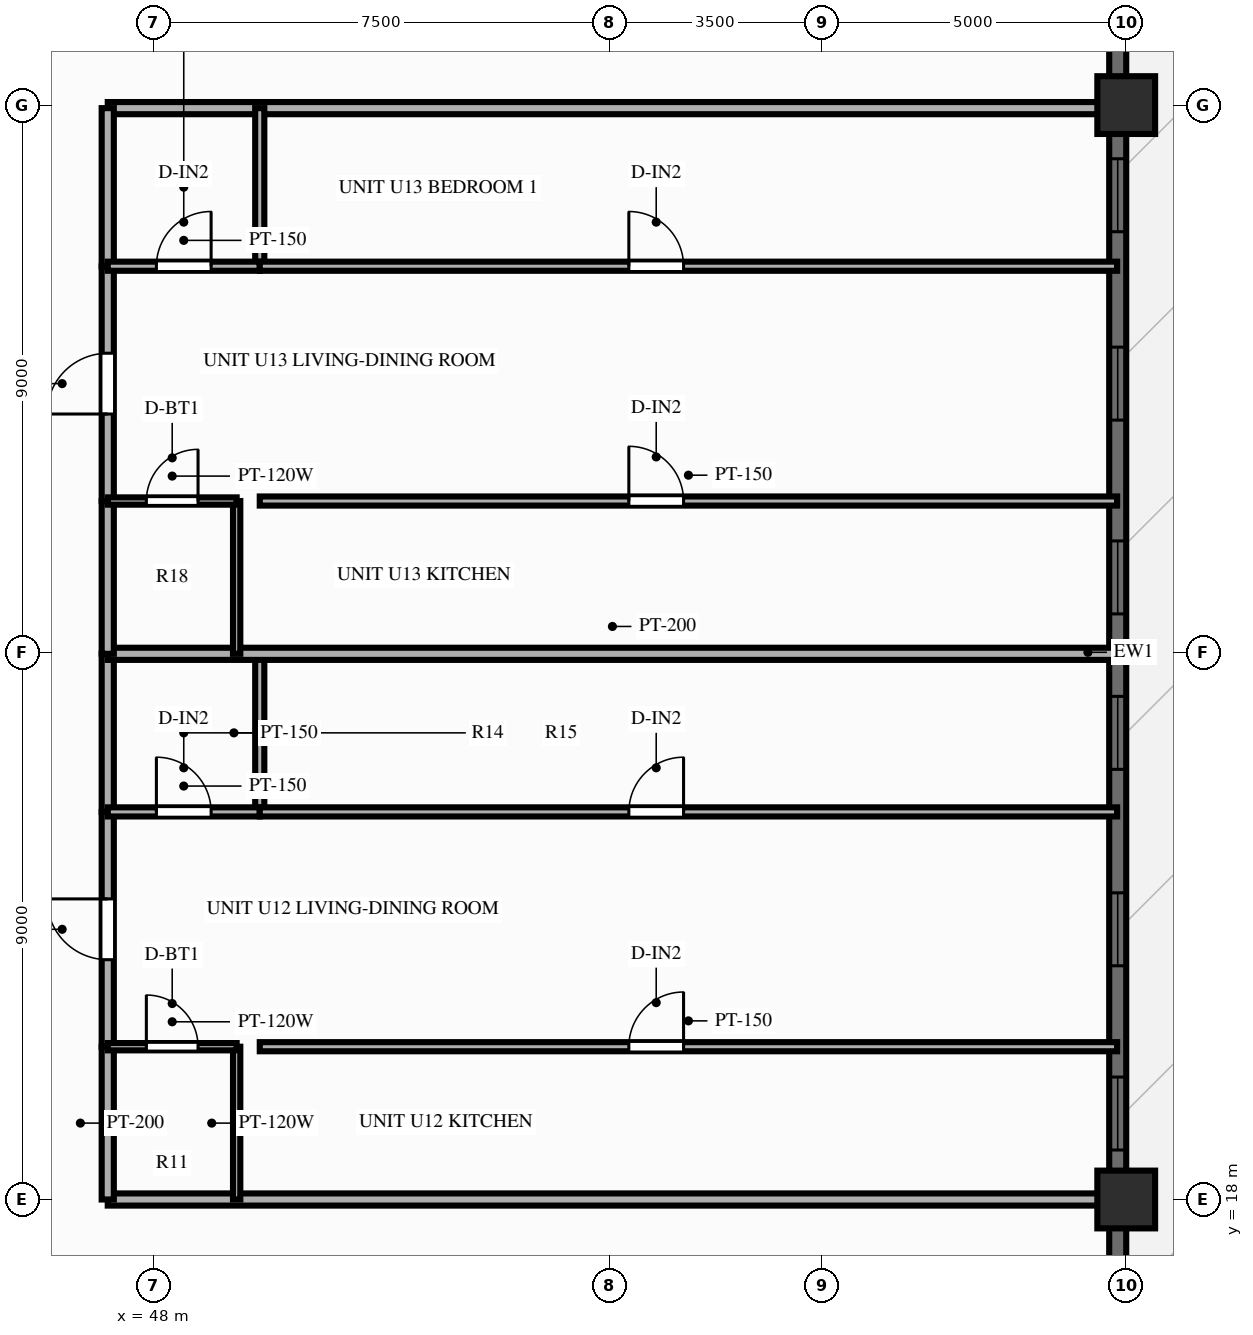
"""IFC4 building model, lengths in metres.
Left out: names, types, materials, properties, quantities, classifications, styles, units other than length and angle.
Written with IfcOpenShell. Run it as: python <this file> out.ifc"""

import sys

from ifc_helpers import new_model, si_unit, direction, frame, frame_2d, origin, origin_2d, place, context, subcontext, project, spatial, rectangle, extrude, source, transform, mapped, element, fill, save


model = new_model("IFC4")
c1 = context("Model", 3, precision=1e-05, world=origin(), true_north=direction((0.0, 1.0)))
c2 = subcontext(c1, "Body", "Model", "MODEL_VIEW")
j1 = project(units=[si_unit("LENGTHUNIT", "METRE"), si_unit("PLANEANGLEUNIT", "RADIAN")], contexts=[c1])
p1 = place(None, origin())
s1 = spatial("IfcSite", under=j1, at=p1, CompositionType="ELEMENT")
p2 = place(p1, origin())
s2 = spatial("IfcBuilding", under=s1, at=p2, CompositionType="ELEMENT")
p3 = place(p2, frame((0.0, 0.0, 89.85)))
s3 = spatial("IfcBuildingStorey", under=s2, at=p3, CompositionType="ELEMENT", Elevation=89.85)
m1 = source(origin(), c2, "Body", "SweptSolid", [
    extrude(rectangle(XDim=0.95, YDim=0.95, at=origin_2d()), origin(), (0.0, 0.0, 1.0), 3.0),
])
for number, where, z_axis, x_axis in (
    (1, (64.0, 18.0, 0.0), (0.0, 0.0, 1.0), (1.0, 0.0, 0.0)),
    (2, (64.0, 36.0, 0.0), (0.0, 0.0, 1.0), (1.0, 0.0, 0.0)),
):
    element("IfcColumn", number, at=place(p3, frame(where, z_axis=z_axis, x_axis=x_axis)), inside=s3, PredefinedType="COLUMN", context=c2, shape_type="MappedRepresentation", body=[
        mapped(m1, transform((0.0, 0.0, 0.0), scale=1.0)),
    ])
p4 = place(p3, frame((63.86, 7.2, 0.0), z_axis=(0.0, 0.0, 1.0), x_axis=(0.0, 1.0, 0.0)))
e3 = element("IfcWall", 3, at=p4, inside=s3, PredefinedType="SOLIDWALL", context=c2, shape_type="SweptSolid", body=[
    extrude(rectangle(XDim=39.6, YDim=0.28, at=frame_2d((19.8, 0.0))), origin(), (0.0, 0.0, 1.0), 2.28),
])
p5 = place(p4, frame((6.2, 0.0, 0.0), z_axis=(0.0, 0.0, 1.0), x_axis=(-1.0, 0.0, 0.0)))
e4 = element("IfcOpeningElement", 4, at=p5, cuts=e3, PredefinedType="OPENING", context=c2, shape_type="SweptSolid", body=[
    extrude(rectangle(XDim=1.6, YDim=2.15, at=frame_2d((0.8, 1.075))), frame((0.0, 0.152, 0.0), z_axis=(0.0, -1.0, 0.0), x_axis=(1.0, 0.0, 0.0)), (0.0, 0.0, 1.0), 0.304),
])
p6 = place(p4, frame((11.614, 0.0, 0.25)))
e5 = element("IfcOpeningElement", 5, at=p6, cuts=e3, PredefinedType="OPENING", context=c2, shape_type="SweptSolid", body=[
    extrude(rectangle(XDim=1.2, YDim=1.5, at=frame_2d((0.6, 0.75))), frame((0.0, 0.152, 0.0), z_axis=(0.0, -1.0, 0.0), x_axis=(1.0, 0.0, 0.0)), (0.0, 0.0, 1.0), 0.304),
])
p7 = place(p4, frame((14.644, 0.0, 0.25)))
e6 = element("IfcOpeningElement", 6, at=p7, cuts=e3, PredefinedType="OPENING", context=c2, shape_type="SweptSolid", body=[
    extrude(rectangle(XDim=1.2, YDim=1.5, at=frame_2d((0.6, 0.75))), frame((0.0, 0.152, 0.0), z_axis=(0.0, -1.0, 0.0), x_axis=(1.0, 0.0, 0.0)), (0.0, 0.0, 1.0), 0.304),
])
p8 = place(p4, frame((17.875, 0.0, 0.25)))
e7 = element("IfcOpeningElement", 7, at=p8, cuts=e3, PredefinedType="OPENING", context=c2, shape_type="SweptSolid", body=[
    extrude(rectangle(XDim=1.2, YDim=1.5, at=frame_2d((0.6, 0.75))), frame((0.0, 0.152, 0.0), z_axis=(0.0, -1.0, 0.0), x_axis=(1.0, 0.0, 0.0)), (0.0, 0.0, 1.0), 0.304),
])
p9 = place(p4, frame((20.431, 0.0, 0.25)))
e8 = element("IfcOpeningElement", 8, at=p9, cuts=e3, PredefinedType="OPENING", context=c2, shape_type="SweptSolid", body=[
    extrude(rectangle(XDim=1.2, YDim=1.5, at=frame_2d((0.6, 0.75))), frame((0.0, 0.152, 0.0), z_axis=(0.0, -1.0, 0.0), x_axis=(1.0, 0.0, 0.0)), (0.0, 0.0, 1.0), 0.304),
])
p10 = place(p4, frame((23.619, 0.0, 0.25)))
e9 = element("IfcOpeningElement", 9, at=p10, cuts=e3, PredefinedType="OPENING", context=c2, shape_type="SweptSolid", body=[
    extrude(rectangle(XDim=1.2, YDim=1.5, at=frame_2d((0.6, 0.75))), frame((0.0, 0.152, 0.0), z_axis=(0.0, -1.0, 0.0), x_axis=(1.0, 0.0, 0.0)), (0.0, 0.0, 1.0), 0.304),
])
p11 = place(p4, frame((26.718, 0.0, 0.25)))
e10 = element("IfcOpeningElement", 10, at=p11, cuts=e3, PredefinedType="OPENING", context=c2, shape_type="SweptSolid", body=[
    extrude(rectangle(XDim=1.2, YDim=1.5, at=frame_2d((0.6, 0.75))), frame((0.0, 0.152, 0.0), z_axis=(0.0, -1.0, 0.0), x_axis=(1.0, 0.0, 0.0)), (0.0, 0.0, 1.0), 0.304),
])
p12 = place(p4, frame((33.6, 0.0, 0.25)))
e11 = element("IfcOpeningElement", 11, at=p12, cuts=e3, PredefinedType="OPENING", context=c2, shape_type="SweptSolid", body=[
    extrude(rectangle(XDim=1.2, YDim=1.5, at=frame_2d((0.6, 0.75))), frame((0.0, 0.152, 0.0), z_axis=(0.0, -1.0, 0.0), x_axis=(1.0, 0.0, 0.0)), (0.0, 0.0, 1.0), 0.304),
])
for number, where, z_axis, x_axis in (
    (12, (47.25, 18.0, 0.0), (0.0, 0.0, 1.0), (1.0, 0.0, 0.0)),
    (13, (47.25, 35.95, 0.0), (0.0, 0.0, 1.0), (1.0, 0.0, 0.0)),
):
    element("IfcWall", number, at=place(p3, frame(where, z_axis=z_axis, x_axis=x_axis)), inside=s3, PredefinedType="PARTITIONING", context=c2, shape_type="SweptSolid", body=[
        extrude(rectangle(XDim=16.6, YDim=0.2, at=frame_2d((8.3, 0.0))), origin(), (0.0, 0.0, 1.0), 2.34),
    ])
p13 = place(p3, frame((47.25, 18.0, 0.0), z_axis=(0.0, 0.0, 1.0), x_axis=(0.0, 1.0, 0.0)))
e14 = element("IfcWall", 14, at=p13, inside=s3, PredefinedType="PARTITIONING", context=c2, shape_type="SweptSolid", body=[
    extrude(rectangle(XDim=2.513, YDim=0.2, at=frame_2d((1.256, 0.0))), origin(), (0.0, 0.0, 1.0), 2.79),
])
p14 = place(p3, frame((47.25, 20.513, 0.0), z_axis=(0.0, 0.0, 1.0), x_axis=(0.0, 1.0, 0.0)))
e15 = element("IfcWall", 15, at=p14, inside=s3, PredefinedType="PARTITIONING", context=c2, shape_type="SweptSolid", body=[
    extrude(rectangle(XDim=3.862, YDim=0.2, at=frame_2d((1.931, 0.0))), origin(), (0.0, 0.0, 1.0), 2.79),
])
p15 = place(p14, frame((1.431, 0.0, 0.0)))
e16 = element("IfcOpeningElement", 16, at=p15, cuts=e15, PredefinedType="OPENING", context=c2, shape_type="SweptSolid", body=[
    extrude(rectangle(XDim=1.0, YDim=2.15, at=frame_2d((0.5, 1.075))), frame((0.0, 0.112, 0.0), z_axis=(0.0, -1.0, 0.0), x_axis=(1.0, 0.0, 0.0)), (0.0, 0.0, 1.0), 0.224),
])
p16 = place(p3, frame((47.25, 24.375, 0.0), z_axis=(0.0, 0.0, 1.0), x_axis=(0.0, 1.0, 0.0)))
e17 = element("IfcWall", 17, at=p16, inside=s3, PredefinedType="PARTITIONING", context=c2, shape_type="SweptSolid", body=[
    extrude(rectangle(XDim=2.6, YDim=0.2, at=frame_2d((1.3, 0.0))), origin(), (0.0, 0.0, 1.0), 2.79),
])
p17 = place(p3, frame((49.37, 18.0, 0.0), z_axis=(0.0, 0.0, 1.0), x_axis=(0.0, 1.0, 0.0)))
e18 = element("IfcWall", 18, at=p17, inside=s3, PredefinedType="PARTITIONING", context=c2, shape_type="SweptSolid", body=[
    extrude(rectangle(XDim=2.513, YDim=0.12, at=frame_2d((1.256, 0.0))), origin(), (0.0, 0.0, 1.0), 2.79),
])
p18 = place(p3, frame((49.75, 24.375, 0.0), z_axis=(0.0, 0.0, 1.0), x_axis=(0.0, 1.0, 0.0)))
e19 = element("IfcWall", 19, at=p18, inside=s3, PredefinedType="PARTITIONING", context=c2, shape_type="SweptSolid", body=[
    extrude(rectangle(XDim=2.6, YDim=0.15, at=frame_2d((1.3, 0.0))), origin(), (0.0, 0.0, 1.0), 2.79),
])
p19 = place(p3, frame((47.25, 20.513, 0.0), z_axis=(0.0, 0.0, 1.0), x_axis=(1.0, 0.0, 0.0)))
e20 = element("IfcWall", 20, at=p19, inside=s3, PredefinedType="PARTITIONING", context=c2, shape_type="SweptSolid", body=[
    extrude(rectangle(XDim=2.12, YDim=0.12, at=frame_2d((1.06, 0.0))), origin(), (0.0, 0.0, 1.0), 2.79),
])
p20 = place(p19, frame((0.635, 0.0, 0.0)))
e21 = element("IfcOpeningElement", 21, at=p20, cuts=e20, PredefinedType="OPENING", context=c2, shape_type="SweptSolid", body=[
    extrude(rectangle(XDim=0.85, YDim=2.05, at=frame_2d((0.425, 1.025))), frame((0.0, 0.072, 0.0), z_axis=(0.0, -1.0, 0.0), x_axis=(1.0, 0.0, 0.0)), (0.0, 0.0, 1.0), 0.144),
])
p21 = place(p3, frame((49.75, 20.513, 0.0), z_axis=(0.0, 0.0, 1.0), x_axis=(1.0, 0.0, 0.0)))
e22 = element("IfcWall", 22, at=p21, inside=s3, PredefinedType="PARTITIONING", context=c2, shape_type="SweptSolid", body=[
    extrude(rectangle(XDim=14.1, YDim=0.15, at=frame_2d((7.05, 0.0))), origin(), (0.0, 0.0, 1.0), 2.79),
])
p22 = place(p21, frame((6.07, 0.0, 0.0)))
e23 = element("IfcOpeningElement", 23, at=p22, cuts=e22, PredefinedType="OPENING", context=c2, shape_type="SweptSolid", body=[
    extrude(rectangle(XDim=0.9, YDim=2.1, at=frame_2d((0.45, 1.05))), frame((0.0, 0.087, 0.0), z_axis=(0.0, -1.0, 0.0), x_axis=(1.0, 0.0, 0.0)), (0.0, 0.0, 1.0), 0.174),
])
p23 = place(p3, frame((47.25, 24.375, 0.0), z_axis=(0.0, 0.0, 1.0), x_axis=(1.0, 0.0, 0.0)))
e24 = element("IfcWall", 24, at=p23, inside=s3, PredefinedType="PARTITIONING", context=c2, shape_type="SweptSolid", body=[
    extrude(rectangle(XDim=2.5, YDim=0.15, at=frame_2d((1.25, 0.0))), origin(), (0.0, 0.0, 1.0), 2.79),
])
p24 = place(p23, frame((0.8, 0.0, 0.0)))
e25 = element("IfcOpeningElement", 25, at=p24, cuts=e24, PredefinedType="OPENING", context=c2, shape_type="SweptSolid", body=[
    extrude(rectangle(XDim=0.9, YDim=2.1, at=frame_2d((0.45, 1.05))), frame((0.0, 0.087, 0.0), z_axis=(0.0, -1.0, 0.0), x_axis=(1.0, 0.0, 0.0)), (0.0, 0.0, 1.0), 0.174),
])
p25 = place(p3, frame((49.75, 24.375, 0.0), z_axis=(0.0, 0.0, 1.0), x_axis=(1.0, 0.0, 0.0)))
e26 = element("IfcWall", 26, at=p25, inside=s3, PredefinedType="PARTITIONING", context=c2, shape_type="SweptSolid", body=[
    extrude(rectangle(XDim=14.1, YDim=0.15, at=frame_2d((7.05, 0.0))), origin(), (0.0, 0.0, 1.0), 2.79),
])
p26 = place(p25, frame((6.07, 0.0, 0.0)))
e27 = element("IfcOpeningElement", 27, at=p26, cuts=e26, PredefinedType="OPENING", context=c2, shape_type="SweptSolid", body=[
    extrude(rectangle(XDim=0.9, YDim=2.1, at=frame_2d((0.45, 1.05))), frame((0.0, 0.087, 0.0), z_axis=(0.0, -1.0, 0.0), x_axis=(1.0, 0.0, 0.0)), (0.0, 0.0, 1.0), 0.174),
])
p27 = place(p3, frame((47.25, 26.975, 0.0), z_axis=(0.0, 0.0, 1.0), x_axis=(1.0, 0.0, 0.0)))
e28 = element("IfcWall", 28, at=p27, inside=s3, PredefinedType="PARTITIONING", context=c2, shape_type="SweptSolid", body=[
    extrude(rectangle(XDim=16.6, YDim=0.2, at=frame_2d((8.3, 0.0))), origin(), (0.0, 0.0, 1.0), 2.79),
])
p28 = place(p3, frame((47.25, 26.975, 0.0), z_axis=(0.0, 0.0, 1.0), x_axis=(0.0, 1.0, 0.0)))
e29 = element("IfcWall", 29, at=p28, inside=s3, PredefinedType="PARTITIONING", context=c2, shape_type="SweptSolid", body=[
    extrude(rectangle(XDim=2.513, YDim=0.2, at=frame_2d((1.256, 0.0))), origin(), (0.0, 0.0, 1.0), 2.79),
])
p29 = place(p3, frame((47.25, 29.488, 0.0), z_axis=(0.0, 0.0, 1.0), x_axis=(0.0, 1.0, 0.0)))
e30 = element("IfcWall", 30, at=p29, inside=s3, PredefinedType="PARTITIONING", context=c2, shape_type="SweptSolid", body=[
    extrude(rectangle(XDim=3.862, YDim=0.2, at=frame_2d((1.931, 0.0))), origin(), (0.0, 0.0, 1.0), 2.79),
])
p30 = place(p29, frame((1.431, 0.0, 0.0)))
e31 = element("IfcOpeningElement", 31, at=p30, cuts=e30, PredefinedType="OPENING", context=c2, shape_type="SweptSolid", body=[
    extrude(rectangle(XDim=1.0, YDim=2.15, at=frame_2d((0.5, 1.075))), frame((0.0, 0.112, 0.0), z_axis=(0.0, -1.0, 0.0), x_axis=(1.0, 0.0, 0.0)), (0.0, 0.0, 1.0), 0.224),
])
p31 = place(p3, frame((47.25, 33.35, 0.0), z_axis=(0.0, 0.0, 1.0), x_axis=(0.0, 1.0, 0.0)))
e32 = element("IfcWall", 32, at=p31, inside=s3, PredefinedType="PARTITIONING", context=c2, shape_type="SweptSolid", body=[
    extrude(rectangle(XDim=2.6, YDim=0.2, at=frame_2d((1.3, 0.0))), origin(), (0.0, 0.0, 1.0), 2.79),
])
p32 = place(p3, frame((49.37, 26.975, 0.0), z_axis=(0.0, 0.0, 1.0), x_axis=(0.0, 1.0, 0.0)))
e33 = element("IfcWall", 33, at=p32, inside=s3, PredefinedType="PARTITIONING", context=c2, shape_type="SweptSolid", body=[
    extrude(rectangle(XDim=2.513, YDim=0.12, at=frame_2d((1.256, 0.0))), origin(), (0.0, 0.0, 1.0), 2.79),
])
p33 = place(p3, frame((49.75, 33.35, 0.0), z_axis=(0.0, 0.0, 1.0), x_axis=(0.0, 1.0, 0.0)))
e34 = element("IfcWall", 34, at=p33, inside=s3, PredefinedType="PARTITIONING", context=c2, shape_type="SweptSolid", body=[
    extrude(rectangle(XDim=2.6, YDim=0.15, at=frame_2d((1.3, 0.0))), origin(), (0.0, 0.0, 1.0), 2.79),
])
p34 = place(p3, frame((47.25, 29.488, 0.0), z_axis=(0.0, 0.0, 1.0), x_axis=(1.0, 0.0, 0.0)))
e35 = element("IfcWall", 35, at=p34, inside=s3, PredefinedType="PARTITIONING", context=c2, shape_type="SweptSolid", body=[
    extrude(rectangle(XDim=2.12, YDim=0.12, at=frame_2d((1.06, 0.0))), origin(), (0.0, 0.0, 1.0), 2.79),
])
p35 = place(p34, frame((0.635, 0.0, 0.0)))
e36 = element("IfcOpeningElement", 36, at=p35, cuts=e35, PredefinedType="OPENING", context=c2, shape_type="SweptSolid", body=[
    extrude(rectangle(XDim=0.85, YDim=2.05, at=frame_2d((0.425, 1.025))), frame((0.0, 0.072, 0.0), z_axis=(0.0, -1.0, 0.0), x_axis=(1.0, 0.0, 0.0)), (0.0, 0.0, 1.0), 0.144),
])
p36 = place(p3, frame((49.75, 29.488, 0.0), z_axis=(0.0, 0.0, 1.0), x_axis=(1.0, 0.0, 0.0)))
e37 = element("IfcWall", 37, at=p36, inside=s3, PredefinedType="PARTITIONING", context=c2, shape_type="SweptSolid", body=[
    extrude(rectangle(XDim=14.1, YDim=0.15, at=frame_2d((7.05, 0.0))), origin(), (0.0, 0.0, 1.0), 2.79),
])
p37 = place(p36, frame((6.07, 0.0, 0.0)))
e38 = element("IfcOpeningElement", 38, at=p37, cuts=e37, PredefinedType="OPENING", context=c2, shape_type="SweptSolid", body=[
    extrude(rectangle(XDim=0.9, YDim=2.1, at=frame_2d((0.45, 1.05))), frame((0.0, 0.087, 0.0), z_axis=(0.0, -1.0, 0.0), x_axis=(1.0, 0.0, 0.0)), (0.0, 0.0, 1.0), 0.174),
])
p38 = place(p3, frame((47.25, 33.35, 0.0), z_axis=(0.0, 0.0, 1.0), x_axis=(1.0, 0.0, 0.0)))
e39 = element("IfcWall", 39, at=p38, inside=s3, PredefinedType="PARTITIONING", context=c2, shape_type="SweptSolid", body=[
    extrude(rectangle(XDim=2.5, YDim=0.15, at=frame_2d((1.25, 0.0))), origin(), (0.0, 0.0, 1.0), 2.79),
])
p39 = place(p38, frame((0.8, 0.0, 0.0)))
e40 = element("IfcOpeningElement", 40, at=p39, cuts=e39, PredefinedType="OPENING", context=c2, shape_type="SweptSolid", body=[
    extrude(rectangle(XDim=0.9, YDim=2.1, at=frame_2d((0.45, 1.05))), frame((0.0, 0.087, 0.0), z_axis=(0.0, -1.0, 0.0), x_axis=(1.0, 0.0, 0.0)), (0.0, 0.0, 1.0), 0.174),
])
p40 = place(p3, frame((49.75, 33.35, 0.0), z_axis=(0.0, 0.0, 1.0), x_axis=(1.0, 0.0, 0.0)))
e41 = element("IfcWall", 41, at=p40, inside=s3, PredefinedType="PARTITIONING", context=c2, shape_type="SweptSolid", body=[
    extrude(rectangle(XDim=14.1, YDim=0.15, at=frame_2d((7.05, 0.0))), origin(), (0.0, 0.0, 1.0), 2.79),
])
p41 = place(p40, frame((6.07, 0.0, 0.0)))
e42 = element("IfcOpeningElement", 42, at=p41, cuts=e41, PredefinedType="OPENING", context=c2, shape_type="SweptSolid", body=[
    extrude(rectangle(XDim=0.9, YDim=2.1, at=frame_2d((0.45, 1.05))), frame((0.0, 0.087, 0.0), z_axis=(0.0, -1.0, 0.0), x_axis=(1.0, 0.0, 0.0)), (0.0, 0.0, 1.0), 0.174),
])
m2 = source(origin(), c2, "Body", "SweptSolid", [
    extrude(rectangle(XDim=1.2, YDim=1.5, at=frame_2d((0.6, 0.75))), frame((0.0, 0.03, 0.0), z_axis=(0.0, -1.0, 0.0), x_axis=(1.0, 0.0, 0.0)), (0.0, 0.0, 1.0), 0.06),
])
p42 = place(p6, origin())
e43 = element("IfcWindow", 43, at=p42, inside=s3, PartitioningType="SINGLE_PANEL", PredefinedType="WINDOW", context=c2, shape_type="MappedRepresentation", body=[
    mapped(m2, transform((0.0, 0.0, 0.0), scale=1.0)),
])
fill(e5, e43)
p43 = place(p7, origin())
e44 = element("IfcWindow", 44, at=p43, inside=s3, PartitioningType="SINGLE_PANEL", PredefinedType="WINDOW", context=c2, shape_type="MappedRepresentation", body=[
    mapped(m2, transform((0.0, 0.0, 0.0), scale=1.0)),
])
fill(e6, e44)
p44 = place(p8, origin())
e45 = element("IfcWindow", 45, at=p44, inside=s3, PartitioningType="SINGLE_PANEL", PredefinedType="WINDOW", context=c2, shape_type="MappedRepresentation", body=[
    mapped(m2, transform((0.0, 0.0, 0.0), scale=1.0)),
])
fill(e7, e45)
p45 = place(p9, origin())
e46 = element("IfcWindow", 46, at=p45, inside=s3, PartitioningType="SINGLE_PANEL", PredefinedType="WINDOW", context=c2, shape_type="MappedRepresentation", body=[
    mapped(m2, transform((0.0, 0.0, 0.0), scale=1.0)),
])
fill(e8, e46)
p46 = place(p10, origin())
e47 = element("IfcWindow", 47, at=p46, inside=s3, PartitioningType="SINGLE_PANEL", PredefinedType="WINDOW", context=c2, shape_type="MappedRepresentation", body=[
    mapped(m2, transform((0.0, 0.0, 0.0), scale=1.0)),
])
fill(e9, e47)
p47 = place(p11, origin())
e48 = element("IfcWindow", 48, at=p47, inside=s3, PartitioningType="SINGLE_PANEL", PredefinedType="WINDOW", context=c2, shape_type="MappedRepresentation", body=[
    mapped(m2, transform((0.0, 0.0, 0.0), scale=1.0)),
])
fill(e10, e48)
m3 = source(origin(), c2, "Body", "SweptSolid", [
    extrude(rectangle(XDim=1.0, YDim=2.15, at=frame_2d((0.5, 1.075))), frame((0.0, 0.025, 0.0), z_axis=(0.0, -1.0, 0.0), x_axis=(1.0, 0.0, 0.0)), (0.0, 0.0, 1.0), 0.05),
])
p48 = place(p15, origin())
e49 = element("IfcDoor", 49, at=p48, inside=s3, OperationType="SINGLE_SWING_RIGHT", PredefinedType="DOOR", context=c2, shape_type="MappedRepresentation", body=[
    mapped(m3, transform((0.0, 0.0, 0.0), scale=1.0)),
])
fill(e16, e49)
m4 = source(origin(), c2, "Body", "SweptSolid", [
    extrude(rectangle(XDim=0.85, YDim=2.05, at=frame_2d((0.425, 1.025))), frame((0.0, 0.025, 0.0), z_axis=(0.0, -1.0, 0.0), x_axis=(1.0, 0.0, 0.0)), (0.0, 0.0, 1.0), 0.05),
])
p49 = place(p20, origin())
e50 = element("IfcDoor", 50, at=p49, inside=s3, OperationType="SINGLE_SWING_LEFT", PredefinedType="DOOR", context=c2, shape_type="MappedRepresentation", body=[
    mapped(m4, transform((0.0, 0.0, 0.0), scale=1.0)),
])
fill(e21, e50)
m5 = source(origin(), c2, "Body", "SweptSolid", [
    extrude(rectangle(XDim=0.9, YDim=2.1, at=frame_2d((0.45, 1.05))), frame((0.0, 0.025, 0.0), z_axis=(0.0, -1.0, 0.0), x_axis=(1.0, 0.0, 0.0)), (0.0, 0.0, 1.0), 0.05),
])
p50 = place(p22, origin())
e51 = element("IfcDoor", 51, at=p50, inside=s3, OperationType="SINGLE_SWING_RIGHT", PredefinedType="DOOR", context=c2, shape_type="MappedRepresentation", body=[
    mapped(m5, transform((0.0, 0.0, 0.0), scale=1.0)),
])
fill(e23, e51)
p51 = place(p24, origin())
e52 = element("IfcDoor", 52, at=p51, inside=s3, OperationType="SINGLE_SWING_LEFT", PredefinedType="DOOR", context=c2, shape_type="MappedRepresentation", body=[
    mapped(m5, transform((0.0, 0.0, 0.0), scale=1.0)),
])
fill(e25, e52)
p52 = place(p26, origin())
e53 = element("IfcDoor", 53, at=p52, inside=s3, OperationType="SINGLE_SWING_RIGHT", PredefinedType="DOOR", context=c2, shape_type="MappedRepresentation", body=[
    mapped(m5, transform((0.0, 0.0, 0.0), scale=1.0)),
])
fill(e27, e53)
p53 = place(p30, origin())
e54 = element("IfcDoor", 54, at=p53, inside=s3, OperationType="SINGLE_SWING_LEFT", PredefinedType="DOOR", context=c2, shape_type="MappedRepresentation", body=[
    mapped(m3, transform((0.0, 0.0, 0.0), scale=1.0)),
])
fill(e31, e54)
p54 = place(p35, origin())
e55 = element("IfcDoor", 55, at=p54, inside=s3, OperationType="SINGLE_SWING_RIGHT", PredefinedType="DOOR", context=c2, shape_type="MappedRepresentation", body=[
    mapped(m4, transform((0.0, 0.0, 0.0), scale=1.0)),
])
fill(e36, e55)
p55 = place(p37, origin())
e56 = element("IfcDoor", 56, at=p55, inside=s3, OperationType="SINGLE_SWING_LEFT", PredefinedType="DOOR", context=c2, shape_type="MappedRepresentation", body=[
    mapped(m5, transform((0.0, 0.0, 0.0), scale=1.0)),
])
fill(e38, e56)
p56 = place(p39, origin())
e57 = element("IfcDoor", 57, at=p56, inside=s3, OperationType="SINGLE_SWING_RIGHT", PredefinedType="DOOR", context=c2, shape_type="MappedRepresentation", body=[
    mapped(m5, transform((0.0, 0.0, 0.0), scale=1.0)),
])
fill(e40, e57)
p57 = place(p41, origin())
e58 = element("IfcDoor", 58, at=p57, inside=s3, OperationType="SINGLE_SWING_LEFT", PredefinedType="DOOR", context=c2, shape_type="MappedRepresentation", body=[
    mapped(m5, transform((0.0, 0.0, 0.0), scale=1.0)),
])
fill(e42, e58)
save(model, sys.argv[1])
